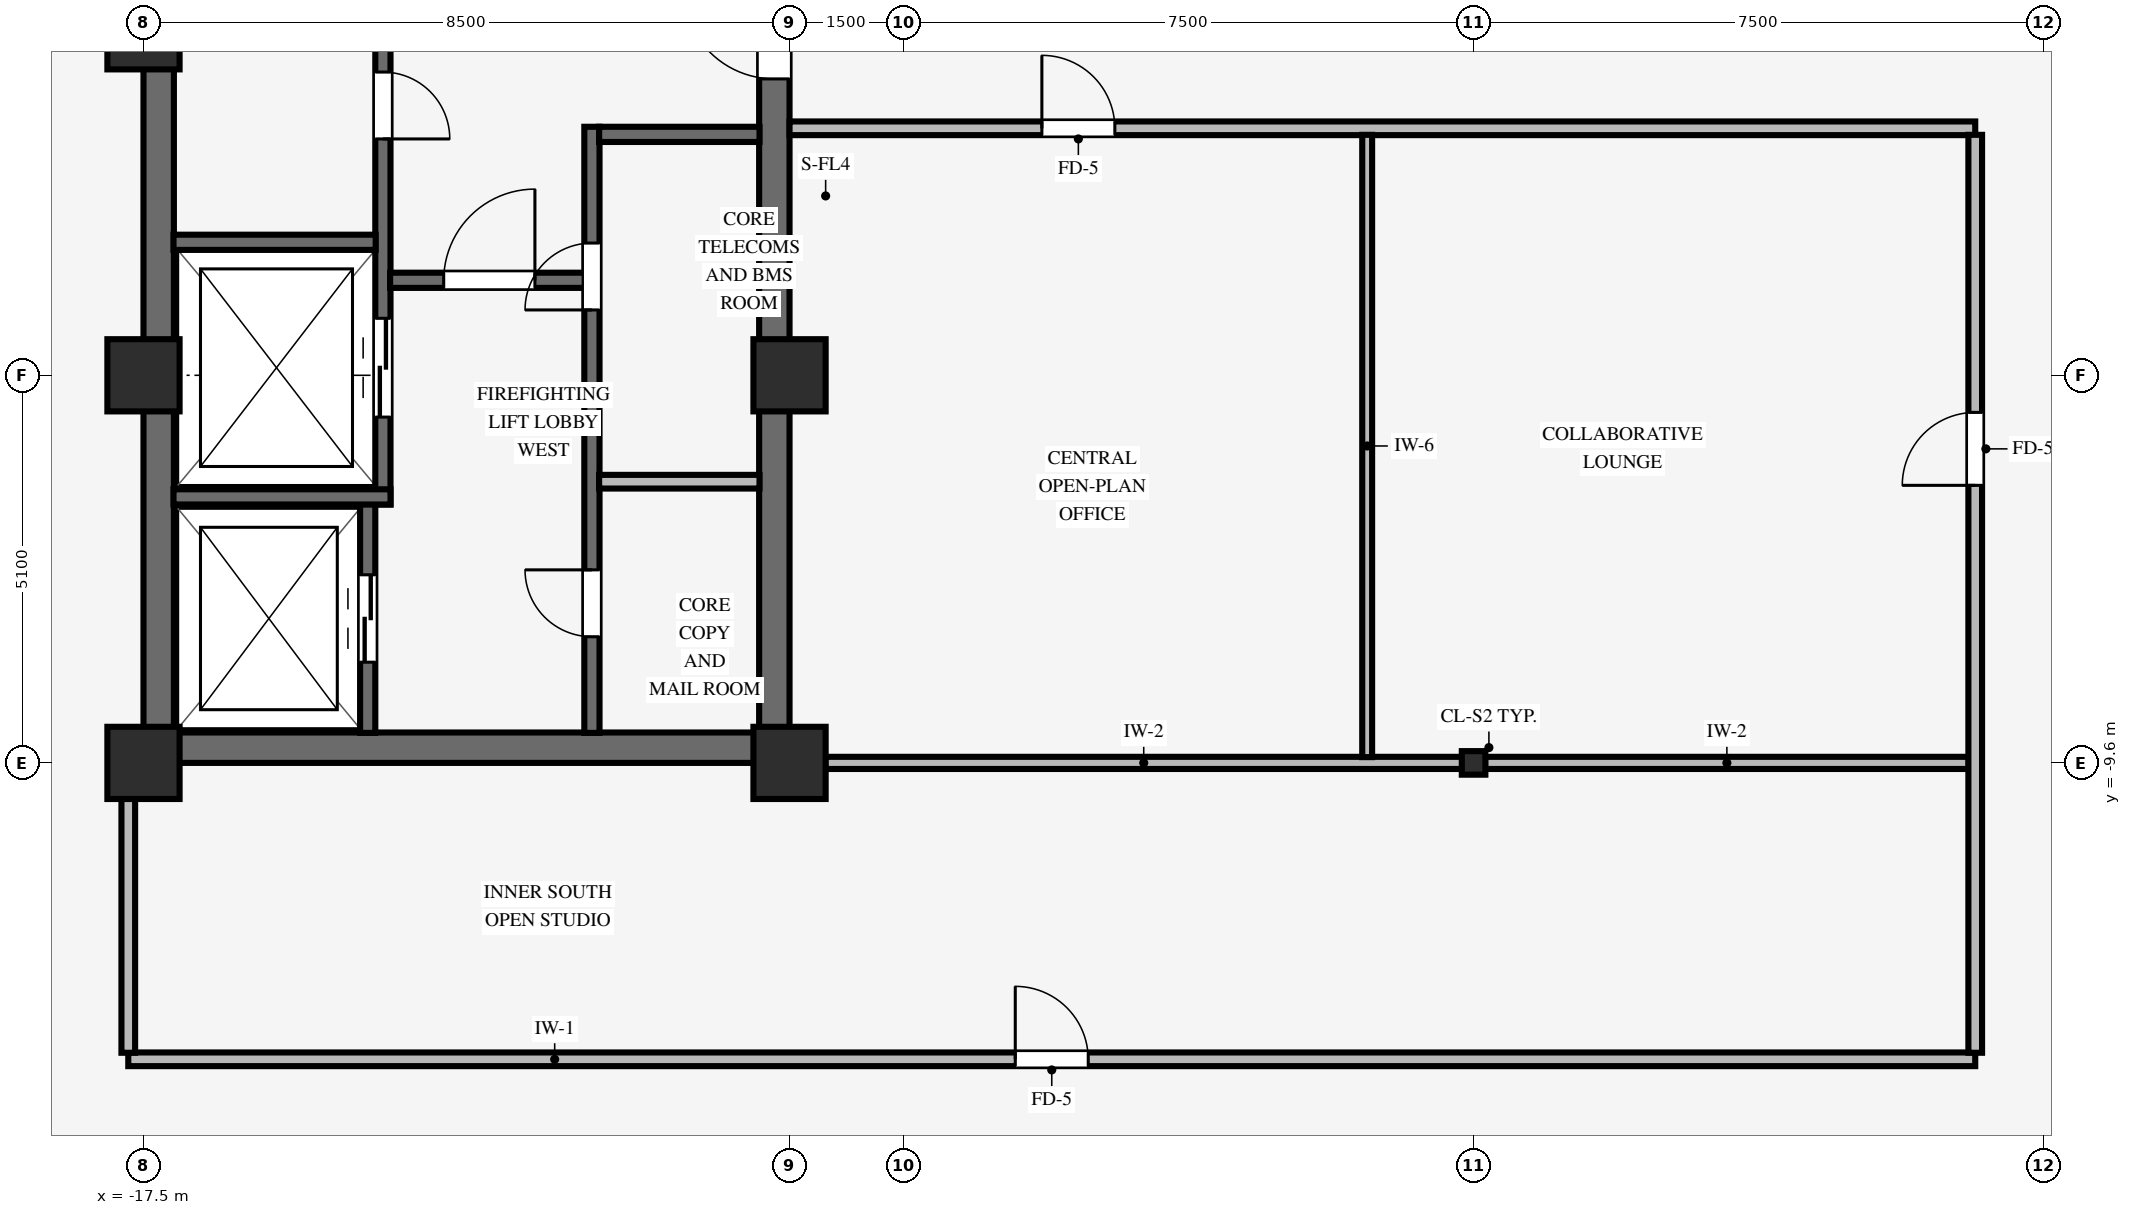
"""IFC4 building model, lengths in metres.
Left out: names, types, materials, properties, quantities, classifications, styles, units other than length and angle.
Written with IfcOpenShell. Run it as: python <this file> out.ifc"""

import sys

from ifc_helpers import new_model, si_unit, direction, frame, frame_2d, origin, origin_2d, place, context, subcontext, project, spatial, rectangle, i_section, extrude, source, transform, mapped, element, fill, save


model = new_model("IFC4")
c1 = context("Model", 3, precision=1e-05, world=origin(), true_north=direction((0.0, 1.0)))
c2 = subcontext(c1, "Body", "Model", "MODEL_VIEW")
j1 = project(units=[si_unit("LENGTHUNIT", "METRE"), si_unit("PLANEANGLEUNIT", "RADIAN")], contexts=[c1])
p1 = place(None, origin())
s1 = spatial("IfcSite", under=j1, at=p1, CompositionType="ELEMENT")
p2 = place(p1, origin())
s2 = spatial("IfcBuilding", under=s1, at=p2, CompositionType="ELEMENT")
p3 = place(p2, frame((0.0, 0.0, 171.3)))
s3 = spatial("IfcBuildingStorey", under=s2, at=p3, CompositionType="ELEMENT", Elevation=171.3)
p4 = place(p3, frame((-17.5, -9.4, 0.0), z_axis=(0.0, 0.0, 1.0), x_axis=(1.0, 0.0, 0.0)))
e1 = element("IfcWall", 1, at=p4, inside=s3, PredefinedType="SHEAR", context=c2, shape_type="SweptSolid", body=[
    extrude(rectangle(XDim=8.5, YDim=0.4, at=frame_2d((4.25, 0.0))), origin(), (0.0, 0.0, 1.0), 3.37),
])
p5 = place(p3, frame((-17.3, -9.205, 0.0), z_axis=(0.0, 0.0, 1.0), x_axis=(0.0, 1.0, 0.0)))
e2 = element("IfcWall", 2, at=p5, inside=s3, PredefinedType="SHEAR", context=c2, shape_type="SweptSolid", body=[
    extrude(rectangle(XDim=18.41, YDim=0.4, at=frame_2d((9.205, 0.0))), origin(), (0.0, 0.0, 1.0), 3.37),
])
p6 = place(p3, frame((-9.2, -9.205, 0.0), z_axis=(0.0, 0.0, 1.0), x_axis=(0.0, 1.0, 0.0)))
e3 = element("IfcWall", 3, at=p6, inside=s3, PredefinedType="SHEAR", context=c2, shape_type="SweptSolid", body=[
    extrude(rectangle(XDim=18.41, YDim=0.4, at=frame_2d((9.205, 0.0))), origin(), (0.0, 0.0, 1.0), 3.37),
])
p7 = place(p6, frame((8.605, 0.0, 0.0)))
e4 = element("IfcOpeningElement", 4, at=p7, cuts=e3, PredefinedType="OPENING", context=c2, shape_type="SweptSolid", body=[
    extrude(rectangle(XDim=1.2, YDim=2.15, at=frame_2d((0.6, 1.075))), frame((0.0, 0.21, 0.0), z_axis=(0.0, -1.0, 0.0), x_axis=(1.0, 0.0, 0.0)), (0.0, 0.0, 1.0), 0.42),
])
for number, where, z_axis, x_axis in (
    (5, (-17.5, -9.6, 0.0), (0.0, 0.0, 1.0), (1.0, 0.0, 0.0)),
    (6, (-17.5, -4.5, 0.0), (0.0, 0.0, 1.0), (1.0, 0.0, 0.0)),
    (7, (-9.0, -9.6, 0.0), (0.0, 0.0, 1.0), (1.0, 0.0, 0.0)),
    (8, (-9.0, -4.5, 0.0), (0.0, 0.0, 1.0), (1.0, 0.0, 0.0)),
    (9, (-17.5, 0.0, 0.0), (0.0, 0.0, 1.0), (1.0, 0.0, 0.0)),
):
    element("IfcColumn", number, at=place(p3, frame(where, z_axis=z_axis, x_axis=x_axis)), inside=s3, PredefinedType="COLUMN", context=c2, shape_type="SweptSolid", body=[
        extrude(rectangle(XDim=0.95, YDim=0.95, at=origin_2d()), origin(), (0.0, 0.0, 1.0), 3.37),
    ])
p8 = place(p3, frame((0.0, -9.6, 0.0), z_axis=(0.0, 0.0, 1.0), x_axis=(1.0, 0.0, 0.0)))
e10 = element("IfcColumn", 10, at=p8, inside=s3, PredefinedType="COLUMN", context=c2, shape_type="SweptSolid", body=[
    extrude(i_section(OverallWidth=0.31, OverallDepth=0.31, WebThickness=0.015, FlangeThickness=0.015, FilletRadius=0.015, at=origin_2d()), origin(), (0.0, 0.0, 1.0), 3.37),
])
p9 = place(p3, frame((-14.55, -9.205, 0.0), z_axis=(0.0, 0.0, 1.0), x_axis=(0.0, 1.0, 0.0)))
e11 = element("IfcWall", 11, at=p9, inside=s3, PredefinedType="SHEAR", context=c2, shape_type="SweptSolid", body=[
    extrude(rectangle(XDim=3.01, YDim=0.2, at=frame_2d((1.505, 0.0))), origin(), (0.0, 0.0, 1.0), 3.37),
])
p10 = place(p9, frame((0.93, 0.0, 0.0)))
e12 = element("IfcOpeningElement", 12, at=p10, cuts=e11, PredefinedType="OPENING", context=c2, shape_type="SweptSolid", body=[
    extrude(rectangle(XDim=1.15, YDim=2.15, at=frame_2d((0.575, 1.075))), frame((0.0, 0.11, 0.0), z_axis=(0.0, -1.0, 0.0), x_axis=(1.0, 0.0, 0.0)), (0.0, 0.0, 1.0), 0.22),
])
p11 = place(p3, frame((-14.35, -6.2, 0.0), z_axis=(0.0, 0.0, 1.0), x_axis=(0.0, 1.0, 0.0)))
e13 = element("IfcWall", 13, at=p11, inside=s3, PredefinedType="SHEAR", context=c2, shape_type="SweptSolid", body=[
    extrude(rectangle(XDim=7.105, YDim=0.2, at=frame_2d((3.552, 0.0))), origin(), (0.0, 0.0, 1.0), 3.37),
])
p12 = place(p11, frame((5.69, 0.0, 0.0), z_axis=(0.0, 0.0, 1.0), x_axis=(-1.0, 0.0, 0.0)))
e14 = element("IfcOpeningElement", 14, at=p12, cuts=e13, PredefinedType="OPENING", context=c2, shape_type="SweptSolid", body=[
    extrude(rectangle(XDim=0.88, YDim=2.1, at=frame_2d((0.44, 1.05))), frame((0.0, 0.11, 0.0), z_axis=(0.0, -1.0, 0.0), x_axis=(1.0, 0.0, 0.0)), (0.0, 0.0, 1.0), 0.22),
])
p13 = place(p11, frame((1.15, 0.0, 0.0)))
e15 = element("IfcOpeningElement", 15, at=p13, cuts=e13, PredefinedType="OPENING", context=c2, shape_type="SweptSolid", body=[
    extrude(rectangle(XDim=1.3, YDim=2.2, at=frame_2d((0.65, 1.1))), frame((0.0, 0.11, 0.0), z_axis=(0.0, -1.0, 0.0), x_axis=(1.0, 0.0, 0.0)), (0.0, 0.0, 1.0), 0.22),
])
p14 = place(p3, frame((-17.105, -6.1, 0.0), z_axis=(0.0, 0.0, 1.0), x_axis=(1.0, 0.0, 0.0)))
e16 = element("IfcWall", 16, at=p14, inside=s3, PredefinedType="SHEAR", context=c2, shape_type="SweptSolid", body=[
    extrude(rectangle(XDim=2.855, YDim=0.2, at=frame_2d((1.427, 0.0))), origin(), (0.0, 0.0, 1.0), 3.37),
])
p15 = place(p3, frame((-17.105, -2.75, 0.0), z_axis=(0.0, 0.0, 1.0), x_axis=(1.0, 0.0, 0.0)))
e17 = element("IfcWall", 17, at=p15, inside=s3, PredefinedType="SHEAR", context=c2, shape_type="SweptSolid", body=[
    extrude(rectangle(XDim=2.66, YDim=0.2, at=frame_2d((1.33, 0.0))), origin(), (0.0, 0.0, 1.0), 3.37),
])
p16 = place(p3, frame((-11.6, -9.205, 0.0), z_axis=(0.0, 0.0, 1.0), x_axis=(0.0, 1.0, 0.0)))
e18 = element("IfcWall", 18, at=p16, inside=s3, PredefinedType="SHEAR", context=c2, shape_type="SweptSolid", body=[
    extrude(rectangle(XDim=7.975, YDim=0.2, at=frame_2d((3.988, 0.0))), origin(), (0.0, 0.0, 1.0), 3.37),
])
p17 = place(p16, frame((1.265, 0.0, 0.0)))
e19 = element("IfcOpeningElement", 19, at=p17, cuts=e18, PredefinedType="OPENING", context=c2, shape_type="SweptSolid", body=[
    extrude(rectangle(XDim=0.88, YDim=2.1, at=frame_2d((0.44, 1.05))), frame((0.0, 0.11, 0.0), z_axis=(0.0, -1.0, 0.0), x_axis=(1.0, 0.0, 0.0)), (0.0, 0.0, 1.0), 0.22),
])
p18 = place(p16, frame((5.565, 0.0, 0.0)))
e20 = element("IfcOpeningElement", 20, at=p18, cuts=e18, PredefinedType="OPENING", context=c2, shape_type="SweptSolid", body=[
    extrude(rectangle(XDim=0.88, YDim=2.1, at=frame_2d((0.44, 1.05))), frame((0.0, 0.11, 0.0), z_axis=(0.0, -1.0, 0.0), x_axis=(1.0, 0.0, 0.0)), (0.0, 0.0, 1.0), 0.22),
])
p19 = place(p3, frame((-14.255, -3.25, 0.0), z_axis=(0.0, 0.0, 1.0), x_axis=(1.0, 0.0, 0.0)))
e21 = element("IfcWall", 21, at=p19, inside=s3, PredefinedType="SHEAR", context=c2, shape_type="SweptSolid", body=[
    extrude(rectangle(XDim=2.56, YDim=0.2, at=frame_2d((1.28, 0.0))), origin(), (0.0, 0.0, 1.0), 3.37),
])
p20 = place(p19, frame((0.705, 0.0, 0.0)))
e22 = element("IfcOpeningElement", 22, at=p20, cuts=e21, PredefinedType="OPENING", context=c2, shape_type="SweptSolid", body=[
    extrude(rectangle(XDim=1.2, YDim=2.15, at=frame_2d((0.6, 1.075))), frame((0.0, 0.11, 0.0), z_axis=(0.0, -1.0, 0.0), x_axis=(1.0, 0.0, 0.0)), (0.0, 0.0, 1.0), 0.22),
])
p21 = place(p3, frame((-11.505, -1.33, 0.0), z_axis=(0.0, 0.0, 1.0), x_axis=(1.0, 0.0, 0.0)))
e23 = element("IfcWall", 23, at=p21, inside=s3, PredefinedType="SHEAR", context=c2, shape_type="SweptSolid", body=[
    extrude(rectangle(XDim=2.11, YDim=0.2, at=frame_2d((1.055, 0.0))), origin(), (0.0, 0.0, 1.0), 3.37),
])
p22 = place(p3, frame((-11.505, -5.9, 0.0), z_axis=(0.0, 0.0, 1.0), x_axis=(1.0, 0.0, 0.0)))
e24 = element("IfcWall", 24, at=p22, inside=s3, PredefinedType="PARTITIONING", context=c2, shape_type="SweptSolid", body=[
    extrude(rectangle(XDim=2.11, YDim=0.18, at=frame_2d((1.055, 0.0))), origin(), (0.0, 0.0, 1.0), 3.36),
])
p23 = place(p3, frame((-17.7, -13.5, 0.0), z_axis=(0.0, 0.0, 1.0), x_axis=(1.0, 0.0, 0.0)))
e25 = element("IfcWall", 25, at=p23, inside=s3, PredefinedType="PARTITIONING", context=c2, shape_type="SweptSolid", body=[
    extrude(rectangle(XDim=24.3, YDim=0.18, at=frame_2d((12.15, 0.0))), origin(), (0.0, 0.0, 1.0), 3.008),
])
p24 = place(p23, frame((11.67, 0.0, 0.0)))
e26 = element("IfcOpeningElement", 26, at=p24, cuts=e25, PredefinedType="OPENING", context=c2, shape_type="SweptSolid", body=[
    extrude(rectangle(XDim=0.96, YDim=2.1, at=frame_2d((0.48, 1.05))), frame((0.0, 0.1, 0.0), z_axis=(0.0, -1.0, 0.0), x_axis=(1.0, 0.0, 0.0)), (0.0, 0.0, 1.0), 0.2),
])
p25 = place(p3, frame((-8.529, -9.6, 0.0), z_axis=(0.0, 0.0, 1.0), x_axis=(1.0, 0.0, 0.0)))
e27 = element("IfcWall", 27, at=p25, inside=s3, PredefinedType="PARTITIONING", context=c2, shape_type="SweptSolid", body=[
    extrude(rectangle(XDim=8.378, YDim=0.16, at=frame_2d((4.189, 0.0))), origin(), (0.0, 0.0, 1.0), 2.405),
])
p26 = place(p3, frame((0.151, -9.6, 0.0), z_axis=(0.0, 0.0, 1.0), x_axis=(1.0, 0.0, 0.0)))
e28 = element("IfcWall", 28, at=p26, inside=s3, PredefinedType="PARTITIONING", context=c2, shape_type="SweptSolid", body=[
    extrude(rectangle(XDim=6.363, YDim=0.16, at=frame_2d((3.182, 0.0))), origin(), (0.0, 0.0, 1.0), 2.405),
])
p27 = place(p3, frame((-9.0, -1.25, 0.0), z_axis=(0.0, 0.0, 1.0), x_axis=(1.0, 0.0, 0.0)))
e29 = element("IfcWall", 29, at=p27, inside=s3, PredefinedType="PARTITIONING", context=c2, shape_type="SweptSolid", body=[
    extrude(rectangle(XDim=15.6, YDim=0.18, at=frame_2d((7.8, 0.0))), origin(), (0.0, 0.0, 1.0), 3.36),
])
p28 = place(p27, frame((3.32, 0.0, 0.0)))
e30 = element("IfcOpeningElement", 30, at=p28, cuts=e29, PredefinedType="OPENING", context=c2, shape_type="SweptSolid", body=[
    extrude(rectangle(XDim=0.96, YDim=2.1, at=frame_2d((0.48, 1.05))), frame((0.0, 0.1, 0.0), z_axis=(0.0, -1.0, 0.0), x_axis=(1.0, 0.0, 0.0)), (0.0, 0.0, 1.0), 0.2),
])
p29 = place(p3, frame((-17.7, -13.414, 0.0), z_axis=(0.0, 0.0, 1.0), x_axis=(0.0, 1.0, 0.0)))
e31 = element("IfcWall", 31, at=p29, inside=s3, PredefinedType="PARTITIONING", context=c2, shape_type="SweptSolid", body=[
    extrude(rectangle(XDim=3.343, YDim=0.18, at=frame_2d((1.671, 0.0))), origin(), (0.0, 0.0, 1.0), 2.816),
])
p30 = place(p3, frame((-1.4, -9.524, 0.0), z_axis=(0.0, 0.0, 1.0), x_axis=(0.0, 1.0, 0.0)))
e32 = element("IfcWall", 32, at=p30, inside=s3, PredefinedType="PARTITIONING", context=c2, shape_type="SweptSolid", body=[
    extrude(rectangle(XDim=8.188, YDim=0.13, at=frame_2d((4.094, 0.0))), origin(), (0.0, 0.0, 1.0), 3.36),
])
p31 = place(p3, frame((6.6, -13.414, 0.0), z_axis=(0.0, 0.0, 1.0), x_axis=(0.0, 1.0, 0.0)))
e33 = element("IfcWall", 33, at=p31, inside=s3, PredefinedType="PARTITIONING", context=c2, shape_type="SweptSolid", body=[
    extrude(rectangle(XDim=12.078, YDim=0.18, at=frame_2d((6.039, 0.0))), origin(), (0.0, 0.0, 1.0), 3.36),
])
p32 = place(p31, frame((7.466, 0.0, 0.0)))
e34 = element("IfcOpeningElement", 34, at=p32, cuts=e33, PredefinedType="OPENING", context=c2, shape_type="SweptSolid", body=[
    extrude(rectangle(XDim=0.96, YDim=2.1, at=frame_2d((0.48, 1.05))), frame((0.0, 0.1, 0.0), z_axis=(0.0, -1.0, 0.0), x_axis=(1.0, 0.0, 0.0)), (0.0, 0.0, 1.0), 0.2),
])
m1 = source(origin(), c2, "Body", "SweptSolid", [
    extrude(rectangle(XDim=0.88, YDim=2.1, at=frame_2d((0.44, 1.05))), frame((0.0, 0.025, 0.0), z_axis=(0.0, -1.0, 0.0), x_axis=(1.0, 0.0, 0.0)), (0.0, 0.0, 1.0), 0.05),
])
p33 = place(p12, origin())
e35 = element("IfcDoor", 35, at=p33, inside=s3, OperationType="SINGLE_SWING_RIGHT", PredefinedType="DOOR", context=c2, shape_type="MappedRepresentation", body=[
    mapped(m1, transform((0.0, 0.0, 0.0), scale=1.0)),
])
fill(e14, e35)
m2 = source(origin(), c2, "Body", "SweptSolid", [
    extrude(rectangle(XDim=1.2, YDim=2.15, at=frame_2d((0.6, 1.075))), frame((0.0, 0.025, 0.0), z_axis=(0.0, -1.0, 0.0), x_axis=(1.0, 0.0, 0.0)), (0.0, 0.0, 1.0), 0.05),
])
p34 = place(p20, origin())
e36 = element("IfcDoor", 36, at=p34, inside=s3, OperationType="SINGLE_SWING_RIGHT", PredefinedType="DOOR", context=c2, shape_type="MappedRepresentation", body=[
    mapped(m2, transform((0.0, 0.0, 0.0), scale=1.0)),
])
fill(e22, e36)
p35 = place(p17, origin())
e37 = element("IfcDoor", 37, at=p35, inside=s3, OperationType="SINGLE_SWING_RIGHT", PredefinedType="DOOR", context=c2, shape_type="MappedRepresentation", body=[
    mapped(m1, transform((0.0, 0.0, 0.0), scale=1.0)),
])
fill(e19, e37)
p36 = place(p18, origin())
e38 = element("IfcDoor", 38, at=p36, inside=s3, OperationType="SINGLE_SWING_LEFT", PredefinedType="DOOR", context=c2, shape_type="MappedRepresentation", body=[
    mapped(m1, transform((0.0, 0.0, 0.0), scale=1.0)),
])
fill(e20, e38)
p37 = place(p7, origin())
e39 = element("IfcDoor", 39, at=p37, inside=s3, OperationType="SINGLE_SWING_RIGHT", PredefinedType="DOOR", context=c2, shape_type="MappedRepresentation", body=[
    mapped(m2, transform((0.0, 0.0, 0.0), scale=1.0)),
])
fill(e4, e39)
m3 = source(origin(), c2, "Body", "SweptSolid", [
    extrude(rectangle(XDim=1.15, YDim=2.15, at=frame_2d((0.575, 1.075))), frame((0.0, 0.025, 0.0), z_axis=(0.0, -1.0, 0.0), x_axis=(1.0, 0.0, 0.0)), (0.0, 0.0, 1.0), 0.05),
])
p38 = place(p10, origin())
e40 = element("IfcDoor", 40, at=p38, inside=s3, OperationType="DOUBLE_DOOR_SLIDING", PredefinedType="DOOR", context=c2, shape_type="MappedRepresentation", body=[
    mapped(m3, transform((0.0, 0.0, 0.0), scale=1.0)),
])
fill(e12, e40)
m4 = source(origin(), c2, "Body", "SweptSolid", [
    extrude(rectangle(XDim=1.3, YDim=2.2, at=frame_2d((0.65, 1.1))), frame((0.0, 0.025, 0.0), z_axis=(0.0, -1.0, 0.0), x_axis=(1.0, 0.0, 0.0)), (0.0, 0.0, 1.0), 0.05),
])
p39 = place(p13, origin())
e41 = element("IfcDoor", 41, at=p39, inside=s3, OperationType="DOUBLE_DOOR_SLIDING", PredefinedType="DOOR", context=c2, shape_type="MappedRepresentation", body=[
    mapped(m4, transform((0.0, 0.0, 0.0), scale=1.0)),
])
fill(e15, e41)
m5 = source(origin(), c2, "Body", "SweptSolid", [
    extrude(rectangle(XDim=0.96, YDim=2.1, at=frame_2d((0.48, 1.05))), frame((0.0, 0.025, 0.0), z_axis=(0.0, -1.0, 0.0), x_axis=(1.0, 0.0, 0.0)), (0.0, 0.0, 1.0), 0.05),
])
p40 = place(p24, origin())
e42 = element("IfcDoor", 42, at=p40, inside=s3, OperationType="SINGLE_SWING_LEFT", PredefinedType="DOOR", context=c2, shape_type="MappedRepresentation", body=[
    mapped(m5, transform((0.0, 0.0, 0.0), scale=1.0)),
])
fill(e26, e42)
p41 = place(p32, origin())
e43 = element("IfcDoor", 43, at=p41, inside=s3, OperationType="SINGLE_SWING_LEFT", PredefinedType="DOOR", context=c2, shape_type="MappedRepresentation", body=[
    mapped(m5, transform((0.0, 0.0, 0.0), scale=1.0)),
])
fill(e34, e43)
p42 = place(p28, origin())
e44 = element("IfcDoor", 44, at=p42, inside=s3, OperationType="SINGLE_SWING_LEFT", PredefinedType="DOOR", context=c2, shape_type="MappedRepresentation", body=[
    mapped(m5, transform((0.0, 0.0, 0.0), scale=1.0)),
])
fill(e30, e44)
save(model, sys.argv[1])
